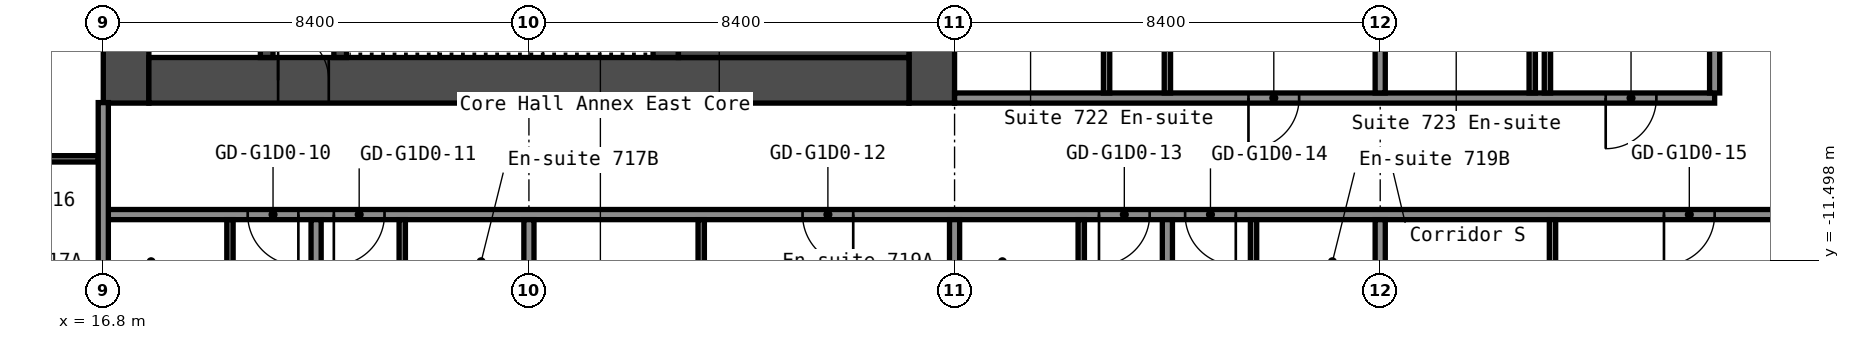
"""IFC4 building model, lengths in metres.
Left out: names, types, materials, properties, quantities, classifications, styles, units other than length and angle.
Written with IfcOpenShell. Run it as: python <this file> out.ifc"""

import sys

from ifc_helpers import new_model, si_unit, direction, frame, frame_2d, origin, place, context, subcontext, project, spatial, rectangle, extrude, element, fill, save


model = new_model("IFC4")
c1 = context("Model", 3, precision=1e-05, world=origin(), true_north=direction((0.0, 1.0)))
c2 = subcontext(c1, "Body", "Model", "MODEL_VIEW")
j1 = project(units=[si_unit("LENGTHUNIT", "METRE"), si_unit("PLANEANGLEUNIT", "RADIAN")], contexts=[c1])
p1 = place(None, origin())
s1 = spatial("IfcSite", under=j1, at=p1, CompositionType="ELEMENT")
p2 = place(p1, origin())
s2 = spatial("IfcBuilding", under=s1, at=p2, CompositionType="ELEMENT")
p3 = place(p2, frame((0.0, 0.0, 29.4)))
s3 = spatial("IfcBuildingStorey", under=s2, at=p3, CompositionType="ELEMENT", Elevation=29.4)
p4 = place(p3, frame((17.25, -8.4, 0.0), z_axis=(0.0, 0.0, 1.0), x_axis=(0.0, 1.0, 0.0)))
e1 = element("IfcWall", 1, at=p4, inside=s3, PredefinedType="SHEAR", context=c2, shape_type="SweptSolid", body=[
    extrude(rectangle(XDim=16.8, YDim=0.9, at=frame_2d((8.4, 0.0))), origin(), (0.0, 0.0, 1.0), 2.8),
])
p5 = place(p4, frame((12.75, 0.0, 0.0)))
e2 = element("IfcOpeningElement", 2, at=p5, cuts=e1, PredefinedType="OPENING", context=c2, shape_type="SweptSolid", body=[
    extrude(rectangle(XDim=1.2, YDim=2.1, at=frame_2d((0.6, 1.05))), frame((0.0, 0.46, 0.0), z_axis=(0.0, -1.0, 0.0), x_axis=(1.0, 0.0, 0.0)), (0.0, 0.0, 1.0), 0.92),
])
p6 = place(p4, frame((2.85, 0.0, 0.0)))
e3 = element("IfcOpeningElement", 3, at=p6, cuts=e1, PredefinedType="OPENING", context=c2, shape_type="SweptSolid", body=[
    extrude(rectangle(XDim=1.2, YDim=2.1, at=frame_2d((0.6, 1.05))), frame((0.0, 0.46, 0.0), z_axis=(0.0, -1.0, 0.0), x_axis=(1.0, 0.0, 0.0)), (0.0, 0.0, 1.0), 0.92),
])
p7 = place(p3, frame((33.15, -8.4, 0.0), z_axis=(0.0, 0.0, 1.0), x_axis=(0.0, 1.0, 0.0)))
e4 = element("IfcWall", 4, at=p7, inside=s3, PredefinedType="SHEAR", context=c2, shape_type="SweptSolid", body=[
    extrude(rectangle(XDim=16.8, YDim=0.9, at=frame_2d((8.4, 0.0))), origin(), (0.0, 0.0, 1.0), 2.8),
])
p8 = place(p3, frame((17.7, -7.95, 0.0), z_axis=(0.0, 0.0, 1.0), x_axis=(1.0, 0.0, 0.0)))
e5 = element("IfcWall", 5, at=p8, inside=s3, PredefinedType="SHEAR", context=c2, shape_type="SweptSolid", body=[
    extrude(rectangle(XDim=15.0, YDim=0.9, at=frame_2d((7.5, 0.0))), origin(), (0.0, 0.0, 1.0), 2.8),
])
p9 = place(p8, frame((2.55, 0.0, 0.0)))
e6 = element("IfcOpeningElement", 6, at=p9, cuts=e5, PredefinedType="OPENING", context=c2, shape_type="SweptSolid", body=[
    extrude(rectangle(XDim=1.0, YDim=2.1, at=frame_2d((0.5, 1.05))), frame((0.0, 0.46, 0.0), z_axis=(0.0, -1.0, 0.0), x_axis=(1.0, 0.0, 0.0)), (0.0, 0.0, 1.0), 0.92),
])
p10 = place(p3, frame((20.025, -7.5, 0.0), z_axis=(0.0, 0.0, 1.0), x_axis=(0.0, 1.0, 0.0)))
e7 = element("IfcWall", 7, at=p10, inside=s3, PredefinedType="SHEAR", context=c2, shape_type="SweptSolid", body=[
    extrude(rectangle(XDim=6.3, YDim=0.25, at=frame_2d((3.15, 0.0))), origin(), (0.0, 0.0, 1.0), 2.8),
])
p11 = place(p10, frame((2.4, 0.0, 0.0)))
e8 = element("IfcOpeningElement", 8, at=p11, cuts=e7, PredefinedType="OPENING", context=c2, shape_type="SweptSolid", body=[
    extrude(rectangle(XDim=1.0, YDim=2.1, at=frame_2d((0.5, 1.05))), frame((0.0, 0.135, 0.0), z_axis=(0.0, -1.0, 0.0), x_axis=(1.0, 0.0, 0.0)), (0.0, 0.0, 1.0), 0.27),
])
p12 = place(p3, frame((21.475, -7.5, 0.0), z_axis=(0.0, 0.0, 1.0), x_axis=(0.0, 1.0, 0.0)))
e9 = element("IfcWall", 9, at=p12, inside=s3, PredefinedType="SHEAR", context=c2, shape_type="SweptSolid", body=[
    extrude(rectangle(XDim=3.75, YDim=0.25, at=frame_2d((1.875, 0.0))), origin(), (0.0, 0.0, 1.0), 2.8),
])
p13 = place(p12, frame((1.3, 0.0, 0.0)))
e10 = element("IfcOpeningElement", 10, at=p13, cuts=e9, PredefinedType="OPENING", context=c2, shape_type="SweptSolid", body=[
    extrude(rectangle(XDim=1.2, YDim=2.1, at=frame_2d((0.6, 1.05))), frame((0.0, 0.135, 0.0), z_axis=(0.0, -1.0, 0.0), x_axis=(1.0, 0.0, 0.0)), (0.0, 0.0, 1.0), 0.27),
])
p14 = place(p3, frame((27.9, -7.5, 0.0), z_axis=(0.0, 0.0, 1.0), x_axis=(0.0, 1.0, 0.0)))
e11 = element("IfcWall", 11, at=p14, inside=s3, PredefinedType="SHEAR", context=c2, shape_type="SweptSolid", body=[
    extrude(rectangle(XDim=3.75, YDim=0.5, at=frame_2d((1.875, 0.0))), origin(), (0.0, 0.0, 1.0), 2.8),
])
p15 = place(p3, frame((28.15, -6.75, 0.0), z_axis=(0.0, 0.0, 1.0), x_axis=(1.0, 0.0, 0.0)))
e12 = element("IfcWall", 12, at=p15, inside=s3, PredefinedType="SHEAR", context=c2, shape_type="SweptSolid", body=[
    extrude(rectangle(XDim=4.55, YDim=1.5, at=frame_2d((2.275, 0.0))), origin(), (0.0, 0.0, 1.0), 2.8),
])
p16 = place(p3, frame((16.8, -10.6, 0.0), z_axis=(0.0, 0.0, 1.0), x_axis=(1.0, 0.0, 0.0)))
e13 = element("IfcWall", 13, at=p16, inside=s3, PredefinedType="PARTITIONING", context=c2, shape_type="SweptSolid", body=[
    extrude(rectangle(XDim=34.3, YDim=0.2, at=frame_2d((17.15, 0.0))), origin(), (0.0, 0.0, 1.0), 2.8),
])
p17 = place(p16, frame((2.85, 0.0, 0.0)))
e14 = element("IfcOpeningElement", 14, at=p17, cuts=e13, PredefinedType="OPENING", context=c2, shape_type="SweptSolid", body=[
    extrude(rectangle(XDim=1.0, YDim=2.1, at=frame_2d((0.5, 1.05))), frame((0.0, 0.11, 0.0), z_axis=(0.0, -1.0, 0.0), x_axis=(1.0, 0.0, 0.0)), (0.0, 0.0, 1.0), 0.22),
])
p18 = place(p16, frame((4.55, 0.0, 0.0)))
e15 = element("IfcOpeningElement", 15, at=p18, cuts=e13, PredefinedType="OPENING", context=c2, shape_type="SweptSolid", body=[
    extrude(rectangle(XDim=1.0, YDim=2.1, at=frame_2d((0.5, 1.05))), frame((0.0, 0.11, 0.0), z_axis=(0.0, -1.0, 0.0), x_axis=(1.0, 0.0, 0.0)), (0.0, 0.0, 1.0), 0.22),
])
p19 = place(p16, frame((13.8, 0.0, 0.0)))
e16 = element("IfcOpeningElement", 16, at=p19, cuts=e13, PredefinedType="OPENING", context=c2, shape_type="SweptSolid", body=[
    extrude(rectangle(XDim=1.0, YDim=2.1, at=frame_2d((0.5, 1.05))), frame((0.0, 0.11, 0.0), z_axis=(0.0, -1.0, 0.0), x_axis=(1.0, 0.0, 0.0)), (0.0, 0.0, 1.0), 0.22),
])
p20 = place(p16, frame((19.65, 0.0, 0.0)))
e17 = element("IfcOpeningElement", 17, at=p20, cuts=e13, PredefinedType="OPENING", context=c2, shape_type="SweptSolid", body=[
    extrude(rectangle(XDim=1.0, YDim=2.1, at=frame_2d((0.5, 1.05))), frame((0.0, 0.11, 0.0), z_axis=(0.0, -1.0, 0.0), x_axis=(1.0, 0.0, 0.0)), (0.0, 0.0, 1.0), 0.22),
])
p21 = place(p16, frame((21.35, 0.0, 0.0)))
e18 = element("IfcOpeningElement", 18, at=p21, cuts=e13, PredefinedType="OPENING", context=c2, shape_type="SweptSolid", body=[
    extrude(rectangle(XDim=1.0, YDim=2.1, at=frame_2d((0.5, 1.05))), frame((0.0, 0.11, 0.0), z_axis=(0.0, -1.0, 0.0), x_axis=(1.0, 0.0, 0.0)), (0.0, 0.0, 1.0), 0.22),
])
p22 = place(p16, frame((30.8, 0.0, 0.0)))
e19 = element("IfcOpeningElement", 19, at=p22, cuts=e13, PredefinedType="OPENING", context=c2, shape_type="SweptSolid", body=[
    extrude(rectangle(XDim=1.0, YDim=2.1, at=frame_2d((0.5, 1.05))), frame((0.0, 0.11, 0.0), z_axis=(0.0, -1.0, 0.0), x_axis=(1.0, 0.0, 0.0)), (0.0, 0.0, 1.0), 0.22),
])
p23 = place(p3, frame((13.462, -9.5, 0.0), z_axis=(0.0, 0.0, 1.0), x_axis=(1.0, 0.0, 0.0)))
e20 = element("IfcWall", 20, at=p23, inside=s3, PredefinedType="PARTITIONING", context=c2, shape_type="SweptSolid", body=[
    extrude(rectangle(XDim=3.238, YDim=0.125, at=frame_2d((1.619, 0.0))), origin(), (0.0, 0.0, 1.0), 2.8),
])
p24 = place(p23, frame((1.238, 0.0, 0.0)))
e21 = element("IfcOpeningElement", 21, at=p24, cuts=e20, PredefinedType="OPENING", context=c2, shape_type="SweptSolid", body=[
    extrude(rectangle(XDim=0.8, YDim=2.1, at=frame_2d((0.4, 1.05))), frame((0.0, 0.073, 0.0), z_axis=(0.0, -1.0, 0.0), x_axis=(1.0, 0.0, 0.0)), (0.0, 0.0, 1.0), 0.145),
])
p25 = place(p3, frame((33.6, -8.3, 0.0), z_axis=(0.0, 0.0, 1.0), x_axis=(1.0, 0.0, 0.0)))
e22 = element("IfcWall", 22, at=p25, inside=s3, PredefinedType="PARTITIONING", context=c2, shape_type="SweptSolid", body=[
    extrude(rectangle(XDim=15.0, YDim=0.2, at=frame_2d((7.5, 0.0))), origin(), (0.0, 0.0, 1.0), 2.8),
])
p26 = place(p25, frame((5.8, 0.0, 0.0)))
e23 = element("IfcOpeningElement", 23, at=p26, cuts=e22, PredefinedType="OPENING", context=c2, shape_type="SweptSolid", body=[
    extrude(rectangle(XDim=1.0, YDim=2.1, at=frame_2d((0.5, 1.05))), frame((0.0, 0.11, 0.0), z_axis=(0.0, -1.0, 0.0), x_axis=(1.0, 0.0, 0.0)), (0.0, 0.0, 1.0), 0.22),
])
p27 = place(p25, frame((12.85, 0.0, 0.0)))
e24 = element("IfcOpeningElement", 24, at=p27, cuts=e22, PredefinedType="OPENING", context=c2, shape_type="SweptSolid", body=[
    extrude(rectangle(XDim=1.0, YDim=2.1, at=frame_2d((0.5, 1.05))), frame((0.0, 0.11, 0.0), z_axis=(0.0, -1.0, 0.0), x_axis=(1.0, 0.0, 0.0)), (0.0, 0.0, 1.0), 0.22),
])
p28 = place(p3, frame((16.8, -20.3, 0.0), z_axis=(0.0, 0.0, 1.0), x_axis=(0.0, 1.0, 0.0)))
e25 = element("IfcWall", 25, at=p28, inside=s3, PredefinedType="PARTITIONING", context=c2, shape_type="SweptSolid", body=[
    extrude(rectangle(XDim=11.91, YDim=0.2, at=frame_2d((5.955, 0.0))), origin(), (0.0, 0.0, 1.0), 2.8),
])
p29 = place(p3, frame((19.3, -13.6, 0.0), z_axis=(0.0, 0.0, 1.0), x_axis=(0.0, 1.0, 0.0)))
e26 = element("IfcWall", 26, at=p29, inside=s3, PredefinedType="PARTITIONING", context=c2, shape_type="SweptSolid", body=[
    extrude(rectangle(XDim=2.9, YDim=0.125, at=frame_2d((1.45, 0.0))), origin(), (0.0, 0.0, 1.0), 2.8),
])
p30 = place(p29, frame((0.6, 0.0, 0.0)))
e27 = element("IfcOpeningElement", 27, at=p30, cuts=e26, PredefinedType="OPENING", context=c2, shape_type="SweptSolid", body=[
    extrude(rectangle(XDim=0.8, YDim=2.1, at=frame_2d((0.4, 1.05))), frame((0.0, 0.073, 0.0), z_axis=(0.0, -1.0, 0.0), x_axis=(1.0, 0.0, 0.0)), (0.0, 0.0, 1.0), 0.145),
])
p31 = place(p3, frame((21.0, -20.3, 0.0), z_axis=(0.0, 0.0, 1.0), x_axis=(0.0, 1.0, 0.0)))
e28 = element("IfcWall", 28, at=p31, inside=s3, PredefinedType="PARTITIONING", context=c2, shape_type="SweptSolid", body=[
    extrude(rectangle(XDim=9.6, YDim=0.2, at=frame_2d((4.8, 0.0))), origin(), (0.0, 0.0, 1.0), 2.8),
])
p32 = place(p3, frame((22.7, -13.6, 0.0), z_axis=(0.0, 0.0, 1.0), x_axis=(0.0, 1.0, 0.0)))
e29 = element("IfcWall", 29, at=p32, inside=s3, PredefinedType="PARTITIONING", context=c2, shape_type="SweptSolid", body=[
    extrude(rectangle(XDim=2.9, YDim=0.125, at=frame_2d((1.45, 0.0))), origin(), (0.0, 0.0, 1.0), 2.8),
])
p33 = place(p32, frame((0.6, 0.0, 0.0)))
e30 = element("IfcOpeningElement", 30, at=p33, cuts=e29, PredefinedType="OPENING", context=c2, shape_type="SweptSolid", body=[
    extrude(rectangle(XDim=0.8, YDim=2.1, at=frame_2d((0.4, 1.05))), frame((0.0, 0.073, 0.0), z_axis=(0.0, -1.0, 0.0), x_axis=(1.0, 0.0, 0.0)), (0.0, 0.0, 1.0), 0.145),
])
p34 = place(p3, frame((25.2, -20.3, 0.0), z_axis=(0.0, 0.0, 1.0), x_axis=(0.0, 1.0, 0.0)))
e31 = element("IfcWall", 31, at=p34, inside=s3, PredefinedType="PARTITIONING", context=c2, shape_type="SweptSolid", body=[
    extrude(rectangle(XDim=9.6, YDim=0.2, at=frame_2d((4.8, 0.0))), origin(), (0.0, 0.0, 1.0), 2.8),
])
p35 = place(p3, frame((28.6, -14.0, 0.0), z_axis=(0.0, 0.0, 1.0), x_axis=(0.0, 1.0, 0.0)))
e32 = element("IfcWall", 32, at=p35, inside=s3, PredefinedType="PARTITIONING", context=c2, shape_type="SweptSolid", body=[
    extrude(rectangle(XDim=3.3, YDim=0.125, at=frame_2d((1.65, 0.0))), origin(), (0.0, 0.0, 1.0), 2.8),
])
p36 = place(p3, frame((33.6, -20.3, 0.0), z_axis=(0.0, 0.0, 1.0), x_axis=(0.0, 1.0, 0.0)))
e33 = element("IfcWall", 33, at=p36, inside=s3, PredefinedType="PARTITIONING", context=c2, shape_type="SweptSolid", body=[
    extrude(rectangle(XDim=9.6, YDim=0.2, at=frame_2d((4.8, 0.0))), origin(), (0.0, 0.0, 1.0), 2.8),
])
p37 = place(p3, frame((36.1, -13.6, 0.0), z_axis=(0.0, 0.0, 1.0), x_axis=(0.0, 1.0, 0.0)))
e34 = element("IfcWall", 34, at=p37, inside=s3, PredefinedType="PARTITIONING", context=c2, shape_type="SweptSolid", body=[
    extrude(rectangle(XDim=2.9, YDim=0.125, at=frame_2d((1.45, 0.0))), origin(), (0.0, 0.0, 1.0), 2.8),
])
p38 = place(p37, frame((0.6, 0.0, 0.0)))
e35 = element("IfcOpeningElement", 35, at=p38, cuts=e34, PredefinedType="OPENING", context=c2, shape_type="SweptSolid", body=[
    extrude(rectangle(XDim=0.8, YDim=2.1, at=frame_2d((0.4, 1.05))), frame((0.0, 0.073, 0.0), z_axis=(0.0, -1.0, 0.0), x_axis=(1.0, 0.0, 0.0)), (0.0, 0.0, 1.0), 0.145),
])
p39 = place(p3, frame((36.6, -8.2, 0.0), z_axis=(0.0, 0.0, 1.0), x_axis=(0.0, 1.0, 0.0)))
e36 = element("IfcWall", 36, at=p39, inside=s3, PredefinedType="PARTITIONING", context=c2, shape_type="SweptSolid", body=[
    extrude(rectangle(XDim=3.1, YDim=0.125, at=frame_2d((1.55, 0.0))), origin(), (0.0, 0.0, 1.0), 2.8),
])
p40 = place(p3, frame((37.8, -20.3, 0.0), z_axis=(0.0, 0.0, 1.0), x_axis=(0.0, 1.0, 0.0)))
e37 = element("IfcWall", 37, at=p40, inside=s3, PredefinedType="PARTITIONING", context=c2, shape_type="SweptSolid", body=[
    extrude(rectangle(XDim=9.6, YDim=0.2, at=frame_2d((4.8, 0.0))), origin(), (0.0, 0.0, 1.0), 2.8),
])
p41 = place(p3, frame((37.8, -8.2, 0.0), z_axis=(0.0, 0.0, 1.0), x_axis=(0.0, 1.0, 0.0)))
e38 = element("IfcWall", 38, at=p41, inside=s3, PredefinedType="PARTITIONING", context=c2, shape_type="SweptSolid", body=[
    extrude(rectangle(XDim=8.1, YDim=0.125, at=frame_2d((4.05, 0.0))), origin(), (0.0, 0.0, 1.0), 2.8),
])
p42 = place(p41, frame((4.05, 0.0, 0.0)))
e39 = element("IfcOpeningElement", 39, at=p42, cuts=e38, PredefinedType="OPENING", context=c2, shape_type="SweptSolid", body=[
    extrude(rectangle(XDim=0.9, YDim=2.1, at=frame_2d((0.45, 1.05))), frame((0.0, 0.073, 0.0), z_axis=(0.0, -1.0, 0.0), x_axis=(1.0, 0.0, 0.0)), (0.0, 0.0, 1.0), 0.145),
])
p43 = place(p3, frame((39.5, -13.6, 0.0), z_axis=(0.0, 0.0, 1.0), x_axis=(0.0, 1.0, 0.0)))
e40 = element("IfcWall", 40, at=p43, inside=s3, PredefinedType="PARTITIONING", context=c2, shape_type="SweptSolid", body=[
    extrude(rectangle(XDim=2.9, YDim=0.125, at=frame_2d((1.45, 0.0))), origin(), (0.0, 0.0, 1.0), 2.8),
])
p44 = place(p43, frame((0.6, 0.0, 0.0)))
e41 = element("IfcOpeningElement", 41, at=p44, cuts=e40, PredefinedType="OPENING", context=c2, shape_type="SweptSolid", body=[
    extrude(rectangle(XDim=0.8, YDim=2.1, at=frame_2d((0.4, 1.05))), frame((0.0, 0.073, 0.0), z_axis=(0.0, -1.0, 0.0), x_axis=(1.0, 0.0, 0.0)), (0.0, 0.0, 1.0), 0.145),
])
p45 = place(p3, frame((42.0, -20.3, 0.0), z_axis=(0.0, 0.0, 1.0), x_axis=(0.0, 1.0, 0.0)))
e42 = element("IfcWall", 42, at=p45, inside=s3, PredefinedType="PARTITIONING", context=c2, shape_type="SweptSolid", body=[
    extrude(rectangle(XDim=9.6, YDim=0.2, at=frame_2d((4.8, 0.0))), origin(), (0.0, 0.0, 1.0), 2.8),
])
p46 = place(p3, frame((42.0, -8.2, 0.0), z_axis=(0.0, 0.0, 1.0), x_axis=(0.0, 1.0, 0.0)))
e43 = element("IfcWall", 43, at=p46, inside=s3, PredefinedType="PARTITIONING", context=c2, shape_type="SweptSolid", body=[
    extrude(rectangle(XDim=8.2, YDim=0.2, at=frame_2d((4.1, 0.0))), origin(), (0.0, 0.0, 1.0), 2.8),
])
p47 = place(p3, frame((45.0, -8.2, 0.0), z_axis=(0.0, 0.0, 1.0), x_axis=(0.0, 1.0, 0.0)))
e44 = element("IfcWall", 44, at=p47, inside=s3, PredefinedType="PARTITIONING", context=c2, shape_type="SweptSolid", body=[
    extrude(rectangle(XDim=3.1, YDim=0.125, at=frame_2d((1.55, 0.0))), origin(), (0.0, 0.0, 1.0), 2.8),
])
p48 = place(p3, frame((45.3, -8.2, 0.0), z_axis=(0.0, 0.0, 1.0), x_axis=(0.0, 1.0, 0.0)))
e45 = element("IfcWall", 45, at=p48, inside=s3, PredefinedType="PARTITIONING", context=c2, shape_type="SweptSolid", body=[
    extrude(rectangle(XDim=8.1, YDim=0.125, at=frame_2d((4.05, 0.0))), origin(), (0.0, 0.0, 1.0), 2.8),
])
p49 = place(p48, frame((4.05, 0.0, 0.0)))
e46 = element("IfcOpeningElement", 46, at=p49, cuts=e45, PredefinedType="OPENING", context=c2, shape_type="SweptSolid", body=[
    extrude(rectangle(XDim=0.9, YDim=2.1, at=frame_2d((0.45, 1.05))), frame((0.0, 0.073, 0.0), z_axis=(0.0, -1.0, 0.0), x_axis=(1.0, 0.0, 0.0)), (0.0, 0.0, 1.0), 0.145),
])
p50 = place(p3, frame((45.4, -14.0, 0.0), z_axis=(0.0, 0.0, 1.0), x_axis=(0.0, 1.0, 0.0)))
e47 = element("IfcWall", 47, at=p50, inside=s3, PredefinedType="PARTITIONING", context=c2, shape_type="SweptSolid", body=[
    extrude(rectangle(XDim=3.3, YDim=0.125, at=frame_2d((1.65, 0.0))), origin(), (0.0, 0.0, 1.0), 2.8),
])
p51 = place(p3, frame((48.6, -8.2, 0.0), z_axis=(0.0, 0.0, 1.0), x_axis=(0.0, 1.0, 0.0)))
e48 = element("IfcWall", 48, at=p51, inside=s3, PredefinedType="PARTITIONING", context=c2, shape_type="SweptSolid", body=[
    extrude(rectangle(XDim=16.4, YDim=0.2, at=frame_2d((8.2, 0.0))), origin(), (0.0, 0.0, 1.0), 2.8),
])
p52 = place(p9, origin())
e49 = element("IfcDoor", 49, at=p52, inside=s3, OperationType="SINGLE_SWING_RIGHT", PredefinedType="DOOR", context=c2, shape_type="SweptSolid", body=[
    extrude(rectangle(XDim=1.0, YDim=2.1, at=frame_2d((0.5, 1.05))), frame((0.0, 0.025, 0.0), z_axis=(0.0, -1.0, 0.0), x_axis=(1.0, 0.0, 0.0)), (0.0, 0.0, 1.0), 0.05),
])
fill(e6, e49)
p53 = place(p17, origin())
e50 = element("IfcDoor", 50, at=p53, inside=s3, OperationType="SINGLE_SWING_RIGHT", PredefinedType="DOOR", context=c2, shape_type="SweptSolid", body=[
    extrude(rectangle(XDim=1.0, YDim=2.1, at=frame_2d((0.5, 1.05))), frame((0.0, 0.025, 0.0), z_axis=(0.0, -1.0, 0.0), x_axis=(1.0, 0.0, 0.0)), (0.0, 0.0, 1.0), 0.05),
])
fill(e14, e50)
p54 = place(p18, origin())
e51 = element("IfcDoor", 51, at=p54, inside=s3, OperationType="SINGLE_SWING_LEFT", PredefinedType="DOOR", context=c2, shape_type="SweptSolid", body=[
    extrude(rectangle(XDim=1.0, YDim=2.1, at=frame_2d((0.5, 1.05))), frame((0.0, 0.025, 0.0), z_axis=(0.0, -1.0, 0.0), x_axis=(1.0, 0.0, 0.0)), (0.0, 0.0, 1.0), 0.05),
])
fill(e15, e51)
p55 = place(p19, origin())
e52 = element("IfcDoor", 52, at=p55, inside=s3, OperationType="SINGLE_SWING_RIGHT", PredefinedType="DOOR", context=c2, shape_type="SweptSolid", body=[
    extrude(rectangle(XDim=1.0, YDim=2.1, at=frame_2d((0.5, 1.05))), frame((0.0, 0.025, 0.0), z_axis=(0.0, -1.0, 0.0), x_axis=(1.0, 0.0, 0.0)), (0.0, 0.0, 1.0), 0.05),
])
fill(e16, e52)
p56 = place(p20, origin())
e53 = element("IfcDoor", 53, at=p56, inside=s3, OperationType="SINGLE_SWING_LEFT", PredefinedType="DOOR", context=c2, shape_type="SweptSolid", body=[
    extrude(rectangle(XDim=1.0, YDim=2.1, at=frame_2d((0.5, 1.05))), frame((0.0, 0.025, 0.0), z_axis=(0.0, -1.0, 0.0), x_axis=(1.0, 0.0, 0.0)), (0.0, 0.0, 1.0), 0.05),
])
fill(e17, e53)
p57 = place(p21, origin())
e54 = element("IfcDoor", 54, at=p57, inside=s3, OperationType="SINGLE_SWING_RIGHT", PredefinedType="DOOR", context=c2, shape_type="SweptSolid", body=[
    extrude(rectangle(XDim=1.0, YDim=2.1, at=frame_2d((0.5, 1.05))), frame((0.0, 0.025, 0.0), z_axis=(0.0, -1.0, 0.0), x_axis=(1.0, 0.0, 0.0)), (0.0, 0.0, 1.0), 0.05),
])
fill(e18, e54)
p58 = place(p22, origin())
e55 = element("IfcDoor", 55, at=p58, inside=s3, OperationType="SINGLE_SWING_LEFT", PredefinedType="DOOR", context=c2, shape_type="SweptSolid", body=[
    extrude(rectangle(XDim=1.0, YDim=2.1, at=frame_2d((0.5, 1.05))), frame((0.0, 0.025, 0.0), z_axis=(0.0, -1.0, 0.0), x_axis=(1.0, 0.0, 0.0)), (0.0, 0.0, 1.0), 0.05),
])
fill(e19, e55)
p59 = place(p26, origin())
e56 = element("IfcDoor", 56, at=p59, inside=s3, OperationType="SINGLE_SWING_LEFT", PredefinedType="DOOR", context=c2, shape_type="SweptSolid", body=[
    extrude(rectangle(XDim=1.0, YDim=2.1, at=frame_2d((0.5, 1.05))), frame((0.0, 0.025, 0.0), z_axis=(0.0, -1.0, 0.0), x_axis=(1.0, 0.0, 0.0)), (0.0, 0.0, 1.0), 0.05),
])
fill(e23, e56)
p60 = place(p27, origin())
e57 = element("IfcDoor", 57, at=p60, inside=s3, OperationType="SINGLE_SWING_LEFT", PredefinedType="DOOR", context=c2, shape_type="SweptSolid", body=[
    extrude(rectangle(XDim=1.0, YDim=2.1, at=frame_2d((0.5, 1.05))), frame((0.0, 0.025, 0.0), z_axis=(0.0, -1.0, 0.0), x_axis=(1.0, 0.0, 0.0)), (0.0, 0.0, 1.0), 0.05),
])
fill(e24, e57)
save(model, sys.argv[1])
